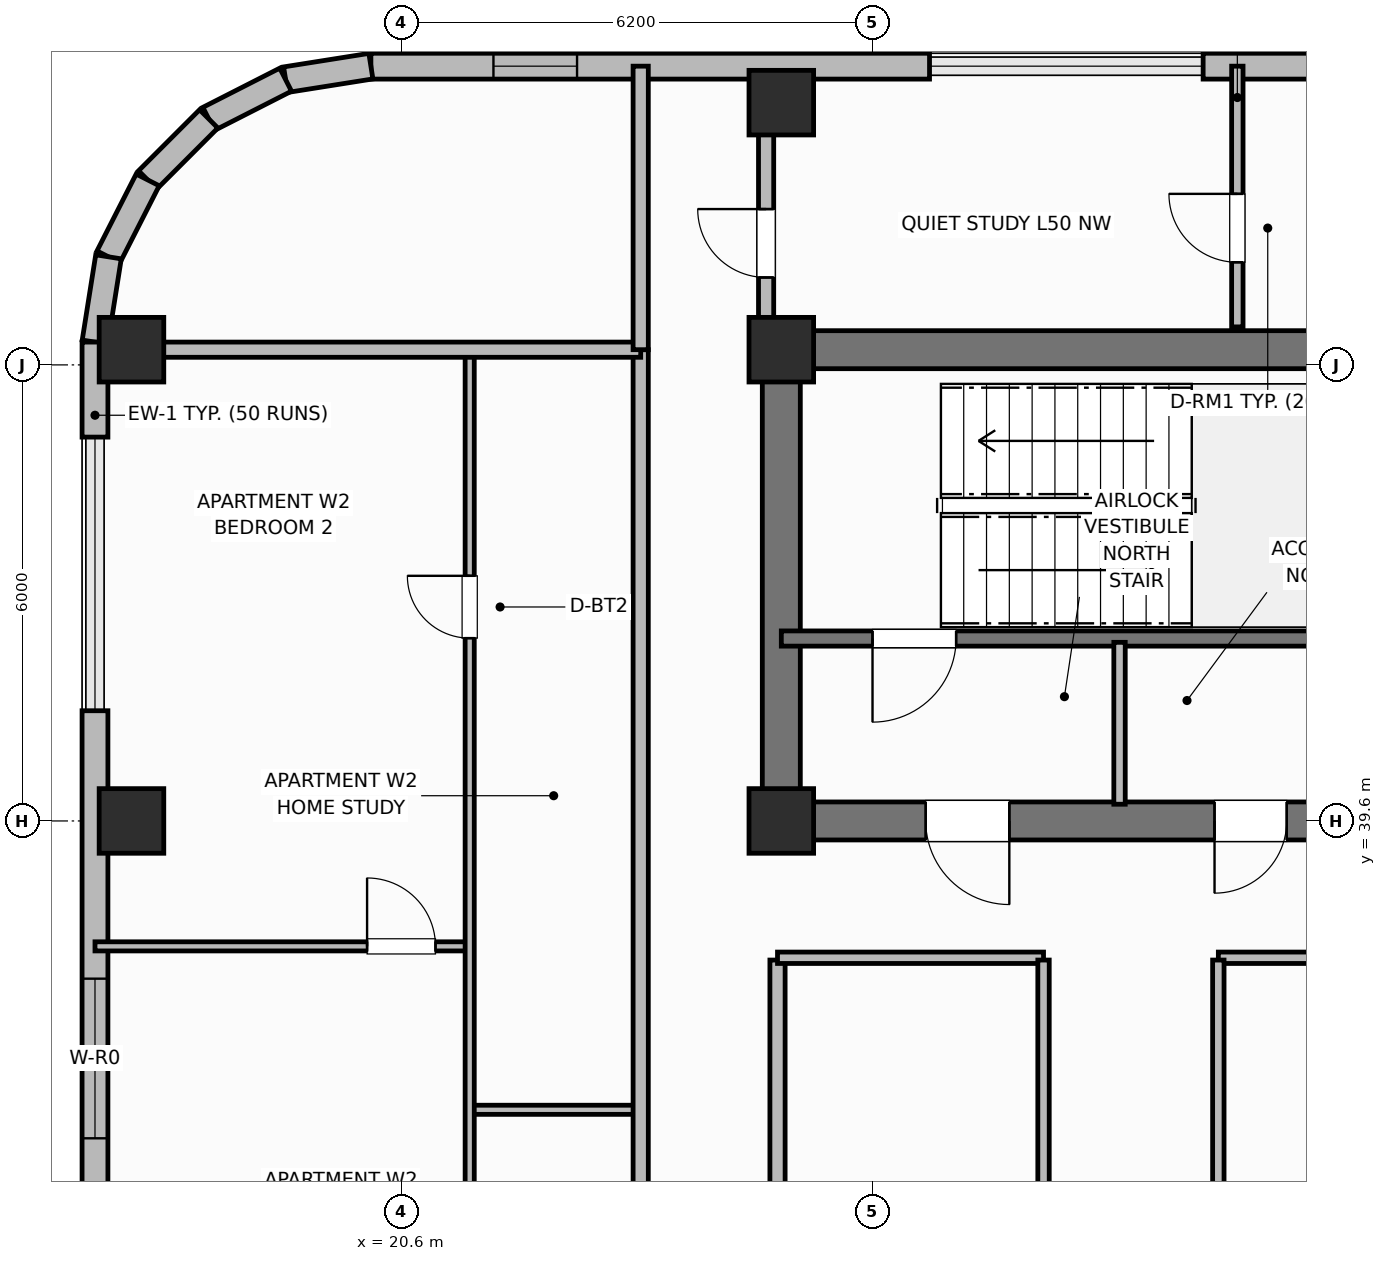
"""IFC4 building model, lengths in metres.
Left out: names, types, materials, properties, quantities, classifications, styles, units other than length and angle.
Written with IfcOpenShell. Run it as: python <this file> out.ifc"""

import sys

from ifc_helpers import new_model, si_unit, direction, frame, frame_2d, origin, origin_2d, place, context, subcontext, project, spatial, rectangle, extrude, element, fill, save


model = new_model("IFC4")
c1 = context("Model", 3, precision=1e-05, world=origin(), true_north=direction((0.0, 1.0)))
c2 = subcontext(c1, "Body", "Model", "MODEL_VIEW")
j1 = project(units=[si_unit("LENGTHUNIT", "METRE"), si_unit("PLANEANGLEUNIT", "RADIAN")], contexts=[c1])
p1 = place(None, origin())
s1 = spatial("IfcSite", under=j1, at=p1, CompositionType="ELEMENT")
p2 = place(p1, origin())
s2 = spatial("IfcBuilding", under=s1, at=p2, CompositionType="ELEMENT")
p3 = place(p2, frame((0.0, 0.0, 203.1)))
s3 = spatial("IfcBuildingStorey", under=s2, at=p3, CompositionType="ELEMENT", Elevation=203.1)
p4 = place(p3, frame((25.6, 45.8, 0.0), z_axis=(0.0, 0.0, 1.0), x_axis=(1.0, 0.0, 0.0)))
e1 = element("IfcWall", 1, at=p4, inside=s3, PredefinedType="SHEAR", context=c2, shape_type="SweptSolid", body=[
    extrude(rectangle(XDim=27.2, YDim=0.5, at=frame_2d((13.6, 0.0))), origin(), (0.0, 0.0, 1.0), 4.2),
])
p5 = place(p3, frame((25.6, 39.85, 0.0), z_axis=(0.0, 0.0, 1.0), x_axis=(0.0, 1.0, 0.0)))
e2 = element("IfcWall", 2, at=p5, inside=s3, PredefinedType="SHEAR", context=c2, shape_type="SweptSolid", body=[
    extrude(rectangle(XDim=5.7, YDim=0.5, at=frame_2d((2.85, 0.0))), origin(), (0.0, 0.0, 1.0), 4.2),
])
p6 = place(p3, frame((52.8, 39.6, 0.0), z_axis=(0.0, 0.0, 1.0), x_axis=(-1.0, 0.0, 0.0)))
e3 = element("IfcWall", 3, at=p6, inside=s3, PredefinedType="SHEAR", context=c2, shape_type="SweptSolid", body=[
    extrude(rectangle(XDim=27.2, YDim=0.5, at=frame_2d((13.6, 0.0))), origin(), (0.0, 0.0, 1.0), 4.2),
])
p7 = place(p6, frame((24.2, 0.0, 0.0)))
e4 = element("IfcOpeningElement", 4, at=p7, cuts=e3, PredefinedType="OPENING", context=c2, shape_type="SweptSolid", body=[
    extrude(rectangle(XDim=1.1, YDim=2.15, at=frame_2d((0.55, 1.075))), frame((0.0, 0.26, 0.0), z_axis=(0.0, -1.0, 0.0), x_axis=(1.0, 0.0, 0.0)), (0.0, 0.0, 1.0), 0.52),
])
p8 = place(p6, frame((20.55, 0.0, 0.0)))
e5 = element("IfcOpeningElement", 5, at=p8, cuts=e3, PredefinedType="OPENING", context=c2, shape_type="SweptSolid", body=[
    extrude(rectangle(XDim=0.95, YDim=2.1, at=frame_2d((0.475, 1.05))), frame((0.0, 0.26, 0.0), z_axis=(0.0, -1.0, 0.0), x_axis=(1.0, 0.0, 0.0)), (0.0, 0.0, 1.0), 0.52),
])
p9 = place(p6, frame((15.1, 0.0, 0.0)))
e6 = element("IfcOpeningElement", 6, at=p9, cuts=e3, PredefinedType="OPENING", context=c2, shape_type="SweptSolid", body=[
    extrude(rectangle(XDim=1.2, YDim=2.15, at=frame_2d((0.6, 1.075))), frame((0.0, 0.26, 0.0), z_axis=(0.0, -1.0, 0.0), x_axis=(1.0, 0.0, 0.0)), (0.0, 0.0, 1.0), 0.52),
])
p10 = place(p6, frame((13.05, 0.0, 0.0)))
e7 = element("IfcOpeningElement", 7, at=p10, cuts=e3, PredefinedType="OPENING", context=c2, shape_type="SweptSolid", body=[
    extrude(rectangle(XDim=0.85, YDim=2.1, at=frame_2d((0.425, 1.05))), frame((0.0, 0.26, 0.0), z_axis=(0.0, -1.0, 0.0), x_axis=(1.0, 0.0, 0.0)), (0.0, 0.0, 1.0), 0.52),
])
p11 = place(p6, frame((11.0, 0.0, 0.0)))
e8 = element("IfcOpeningElement", 8, at=p11, cuts=e3, PredefinedType="OPENING", context=c2, shape_type="SweptSolid", body=[
    extrude(rectangle(XDim=0.85, YDim=2.1, at=frame_2d((0.425, 1.05))), frame((0.0, 0.26, 0.0), z_axis=(0.0, -1.0, 0.0), x_axis=(1.0, 0.0, 0.0)), (0.0, 0.0, 1.0), 0.52),
])
p12 = place(p6, frame((7.35, 0.0, 0.0)))
e9 = element("IfcOpeningElement", 9, at=p12, cuts=e3, PredefinedType="OPENING", context=c2, shape_type="SweptSolid", body=[
    extrude(rectangle(XDim=0.85, YDim=2.1, at=frame_2d((0.425, 1.05))), frame((0.0, 0.26, 0.0), z_axis=(0.0, -1.0, 0.0), x_axis=(1.0, 0.0, 0.0)), (0.0, 0.0, 1.0), 0.52),
])
p13 = place(p6, frame((4.2, 0.0, 0.0)))
e10 = element("IfcOpeningElement", 10, at=p13, cuts=e3, PredefinedType="OPENING", context=c2, shape_type="SweptSolid", body=[
    extrude(rectangle(XDim=1.3, YDim=2.2, at=frame_2d((0.65, 1.1))), frame((0.0, 0.26, 0.0), z_axis=(0.0, -1.0, 0.0), x_axis=(1.0, 0.0, 0.0)), (0.0, 0.0, 1.0), 0.52),
])
for number, where, z_axis, x_axis in (
    (11, (25.6, 39.6, 0.0), (0.0, 0.0, 1.0), (1.0, 0.0, 0.0)),
    (12, (25.6, 45.8, 0.0), (0.0, 0.0, 1.0), (1.0, 0.0, 0.0)),
    (13, (25.6, 49.05, 0.0), (0.0, 0.0, 1.0), (1.0, 0.0, 0.0)),
    (14, (17.05, 39.6, 0.0), (0.0, 0.0, 1.0), (1.0, 0.0, 0.0)),
    (15, (17.05, 45.8, 0.0), (0.0, 0.0, 1.0), (1.0, 0.0, 0.0)),
):
    element("IfcColumn", number, at=place(p3, frame(where, z_axis=z_axis, x_axis=x_axis)), inside=s3, PredefinedType="COLUMN", context=c2, shape_type="SweptSolid", body=[
        extrude(rectangle(XDim=0.85, YDim=0.85, at=origin_2d()), origin(), (0.0, 0.0, 1.0), 4.2),
    ])
p14 = place(p3, frame((36.0, 49.53, 0.0), z_axis=(0.0, 0.0, 1.0), x_axis=(-1.0, 0.0, 0.0)))
e16 = element("IfcWall", 16, at=p14, inside=s3, PredefinedType="SOLIDWALL", context=c2, shape_type="SweptSolid", body=[
    extrude(rectangle(XDim=4.85, YDim=0.34, at=frame_2d((2.425, 0.0))), origin(), (0.0, 0.0, 1.0), 3.22),
])
p15 = place(p14, frame((2.225, 0.0, 0.95)))
e17 = element("IfcOpeningElement", 17, at=p15, cuts=e16, PredefinedType="OPENING", context=c2, shape_type="SweptSolid", body=[
    extrude(rectangle(XDim=1.1, YDim=1.65, at=frame_2d((0.55, 0.825))), frame((0.0, 0.18, 0.0), z_axis=(0.0, -1.0, 0.0), x_axis=(1.0, 0.0, 0.0)), (0.0, 0.0, 1.0), 0.36),
])
p16 = place(p3, frame((27.55, 49.53, 0.0), z_axis=(0.0, 0.0, 1.0), x_axis=(-1.0, 0.0, 0.0)))
e18 = element("IfcWall", 18, at=p16, inside=s3, PredefinedType="SOLIDWALL", context=c2, shape_type="SweptSolid", body=[
    extrude(rectangle(XDim=7.35, YDim=0.34, at=frame_2d((3.675, 0.0))), origin(), (0.0, 0.0, 1.0), 3.22),
])
p17 = place(p16, frame((4.637, 0.0, 0.95)))
e19 = element("IfcOpeningElement", 19, at=p17, cuts=e18, PredefinedType="OPENING", context=c2, shape_type="SweptSolid", body=[
    extrude(rectangle(XDim=1.1, YDim=1.65, at=frame_2d((0.55, 0.825))), frame((0.0, 0.18, 0.0), z_axis=(0.0, -1.0, 0.0), x_axis=(1.0, 0.0, 0.0)), (0.0, 0.0, 1.0), 0.36),
])
p18 = place(p3, frame((20.2, 49.53, 0.0), z_axis=(0.0, 0.0, 1.0), x_axis=(-0.987675651954, -0.156514556949, 0.0)))
e20 = element("IfcWall", 20, at=p18, inside=s3, PredefinedType="SOLIDWALL", context=c2, shape_type="SweptSolid", body=[
    extrude(rectangle(XDim=1.135, YDim=0.34, at=frame_2d((0.568, 0.0))), origin(), (0.0, 0.0, 1.0), 3.22),
])
for number, where, z_axis, x_axis in (
    (21, (19.078, 49.352, 0.0), (0.0, 0.0, 1.0), (-0.891, -0.454, 0.0)),
    (22, (18.066, 48.837, 0.0), (0.0, 0.0, 1.0), (-0.707, -0.707, 0.0)),
    (23, (17.263, 48.034, 0.0), (0.0, 0.0, 1.0), (-0.454, -0.891, 0.0)),
    (24, (16.748, 47.022, 0.0), (0.0, 0.0, 1.0), (-0.156, -0.988, 0.0)),
):
    element("IfcWall", number, at=place(p3, frame(where, z_axis=z_axis, x_axis=x_axis)), inside=s3, PredefinedType="SOLIDWALL", context=c2, shape_type="SweptSolid", body=[
        extrude(rectangle(XDim=1.136, YDim=0.34, at=frame_2d((0.568, 0.0))), origin(), (0.0, 0.0, 1.0), 3.22),
    ])
p19 = place(p3, frame((16.57, 45.9, 0.0), z_axis=(0.0, 0.0, 1.0), x_axis=(0.0, -1.0, 0.0)))
e25 = element("IfcWall", 25, at=p19, inside=s3, PredefinedType="SOLIDWALL", context=c2, shape_type="SweptSolid", body=[
    extrude(rectangle(XDim=1.25, YDim=0.34, at=frame_2d((0.625, 0.0))), origin(), (0.0, 0.0, 1.0), 3.22),
])
p20 = place(p3, frame((16.57, 41.05, 0.0), z_axis=(0.0, 0.0, 1.0), x_axis=(0.0, -1.0, 0.0)))
e26 = element("IfcWall", 26, at=p20, inside=s3, PredefinedType="SOLIDWALL", context=c2, shape_type="SweptSolid", body=[
    extrude(rectangle(XDim=8.45, YDim=0.34, at=frame_2d((4.225, 0.0))), origin(), (0.0, 0.0, 1.0), 3.22),
])
p21 = place(p20, frame((3.525, 0.0, 0.8)))
e27 = element("IfcOpeningElement", 27, at=p21, cuts=e26, PredefinedType="OPENING", context=c2, shape_type="SweptSolid", body=[
    extrude(rectangle(XDim=2.1, YDim=1.9, at=frame_2d((1.05, 0.95))), frame((0.0, 0.18, 0.0), z_axis=(0.0, -1.0, 0.0), x_axis=(1.0, 0.0, 0.0)), (0.0, 0.0, 1.0), 0.36),
])
p22 = place(p3, frame((35.15, 42.0, 0.0), z_axis=(0.0, 0.0, 1.0), x_axis=(-1.0, 0.0, 0.0)))
e28 = element("IfcWall", 28, at=p22, inside=s3, PredefinedType="SHEAR", context=c2, shape_type="SweptSolid", body=[
    extrude(rectangle(XDim=9.55, YDim=0.2, at=frame_2d((4.775, 0.0))), origin(), (0.0, 0.0, 1.0), 4.2),
])
p23 = place(p22, frame((7.25, 0.0, 0.0)))
e29 = element("IfcOpeningElement", 29, at=p23, cuts=e28, PredefinedType="OPENING", context=c2, shape_type="SweptSolid", body=[
    extrude(rectangle(XDim=1.1, YDim=2.15, at=frame_2d((0.55, 1.075))), frame((0.0, 0.11, 0.0), z_axis=(0.0, -1.0, 0.0), x_axis=(1.0, 0.0, 0.0)), (0.0, 0.0, 1.0), 0.22),
])
p24 = place(p3, frame((30.05, 39.82, 0.0), z_axis=(0.0, 0.0, 1.0), x_axis=(0.0, 1.0, 0.0)))
e30 = element("IfcWall", 30, at=p24, inside=s3, PredefinedType="PARTITIONING", context=c2, shape_type="SweptSolid", body=[
    extrude(rectangle(XDim=2.13, YDim=0.15, at=frame_2d((1.065, 0.0))), origin(), (0.0, 0.0, 1.0), 3.05),
])
p25 = place(p3, frame((25.55, 18.63, 0.0), z_axis=(0.0, 0.0, 1.0), x_axis=(0.0, 1.0, 0.0)))
e31 = element("IfcWall", 31, at=p25, inside=s3, PredefinedType="PARTITIONING", context=c2, shape_type="SweptSolid", body=[
    extrude(rectangle(XDim=19.14, YDim=0.2, at=frame_2d((9.57, 0.0))), origin(), (0.0, 0.0, 1.0), 3.05),
])
p26 = place(p3, frame((25.55, 37.8, 0.0), z_axis=(0.0, 0.0, 1.0), x_axis=(1.0, 0.0, 0.0)))
e32 = element("IfcWall", 32, at=p26, inside=s3, PredefinedType="PARTITIONING", context=c2, shape_type="SweptSolid", body=[
    extrude(rectangle(XDim=3.5, YDim=0.15, at=frame_2d((1.75, 0.0))), origin(), (0.0, 0.0, 1.0), 3.05),
])
p27 = place(p3, frame((31.35, 37.8, 0.0), z_axis=(0.0, 0.0, 1.0), x_axis=(1.0, 0.0, 0.0)))
e33 = element("IfcWall", 33, at=p27, inside=s3, PredefinedType="PARTITIONING", context=c2, shape_type="SweptSolid", body=[
    extrude(rectangle(XDim=21.5, YDim=0.15, at=frame_2d((10.75, 0.0))), origin(), (0.0, 0.0, 1.0), 3.05),
])
p28 = place(p3, frame((29.05, 18.63, 0.0), z_axis=(0.0, 0.0, 1.0), x_axis=(0.0, 1.0, 0.0)))
e34 = element("IfcWall", 34, at=p28, inside=s3, PredefinedType="PARTITIONING", context=c2, shape_type="SweptSolid", body=[
    extrude(rectangle(XDim=19.14, YDim=0.15, at=frame_2d((9.57, 0.0))), origin(), (0.0, 0.0, 1.0), 3.05),
])
p29 = place(p28, frame((5.5, 0.0, 0.0)))
e35 = element("IfcOpeningElement", 35, at=p29, cuts=e34, PredefinedType="OPENING", context=c2, shape_type="SweptSolid", body=[
    extrude(rectangle(XDim=1.0, YDim=2.15, at=frame_2d((0.5, 1.075))), frame((0.0, 0.085, 0.0), z_axis=(0.0, -1.0, 0.0), x_axis=(1.0, 0.0, 0.0)), (0.0, 0.0, 1.0), 0.17),
])
p30 = place(p3, frame((31.35, 18.63, 0.0), z_axis=(0.0, 0.0, 1.0), x_axis=(0.0, 1.0, 0.0)))
e36 = element("IfcWall", 36, at=p30, inside=s3, PredefinedType="PARTITIONING", context=c2, shape_type="SweptSolid", body=[
    extrude(rectangle(XDim=19.14, YDim=0.15, at=frame_2d((9.57, 0.0))), origin(), (0.0, 0.0, 1.0), 3.05),
])
p31 = place(p30, frame((2.4, 0.0, 0.0)))
e37 = element("IfcOpeningElement", 37, at=p31, cuts=e36, PredefinedType="OPENING", context=c2, shape_type="SweptSolid", body=[
    extrude(rectangle(XDim=1.3, YDim=2.2, at=frame_2d((0.65, 1.1))), frame((0.0, 0.085, 0.0), z_axis=(0.0, -1.0, 0.0), x_axis=(1.0, 0.0, 0.0)), (0.0, 0.0, 1.0), 0.17),
])
p32 = place(p30, frame((12.719, 0.0, 0.0)))
e38 = element("IfcOpeningElement", 38, at=p32, cuts=e36, PredefinedType="OPENING", context=c2, shape_type="SweptSolid", body=[
    extrude(rectangle(XDim=1.0, YDim=2.15, at=frame_2d((0.5, 1.075))), frame((0.0, 0.085, 0.0), z_axis=(0.0, -1.0, 0.0), x_axis=(1.0, 0.0, 0.0)), (0.0, 0.0, 1.0), 0.17),
])
p33 = place(p3, frame((21.5, 35.8, 0.0), z_axis=(0.0, 0.0, 1.0), x_axis=(1.0, 0.0, 0.0)))
e39 = element("IfcWall", 39, at=p33, inside=s3, PredefinedType="PARTITIONING", context=c2, shape_type="SweptSolid", body=[
    extrude(rectangle(XDim=2.25, YDim=0.12, at=frame_2d((1.125, 0.0))), origin(), (0.0, 0.0, 1.0), 3.05),
])
p34 = place(p3, frame((16.57, 37.95, 0.0), z_axis=(0.0, 0.0, 1.0), x_axis=(1.0, 0.0, 0.0)))
e40 = element("IfcWall", 40, at=p34, inside=s3, PredefinedType="PARTITIONING", context=c2, shape_type="SweptSolid", body=[
    extrude(rectangle(XDim=4.93, YDim=0.12, at=frame_2d((2.465, 0.0))), origin(), (0.0, 0.0, 1.0), 3.05),
])
p35 = place(p34, frame((3.58, 0.0, 0.0)))
e41 = element("IfcOpeningElement", 41, at=p35, cuts=e40, PredefinedType="OPENING", context=c2, shape_type="SweptSolid", body=[
    extrude(rectangle(XDim=0.9, YDim=2.1, at=frame_2d((0.45, 1.05))), frame((0.0, 0.07, 0.0), z_axis=(0.0, -1.0, 0.0), x_axis=(1.0, 0.0, 0.0)), (0.0, 0.0, 1.0), 0.14),
])
p36 = place(p3, frame((21.5, 26.64, 0.0), z_axis=(0.0, 0.0, 1.0), x_axis=(0.0, 1.0, 0.0)))
e42 = element("IfcWall", 42, at=p36, inside=s3, PredefinedType="PARTITIONING", context=c2, shape_type="SweptSolid", body=[
    extrude(rectangle(XDim=19.12, YDim=0.12, at=frame_2d((9.56, 0.0))), origin(), (0.0, 0.0, 1.0), 3.05),
])
p37 = place(p36, frame((2.81, 0.0, 0.0)))
e43 = element("IfcOpeningElement", 43, at=p37, cuts=e42, PredefinedType="OPENING", context=c2, shape_type="SweptSolid", body=[
    extrude(rectangle(XDim=0.9, YDim=2.1, at=frame_2d((0.45, 1.05))), frame((0.0, 0.07, 0.0), z_axis=(0.0, -1.0, 0.0), x_axis=(1.0, 0.0, 0.0)), (0.0, 0.0, 1.0), 0.14),
])
p38 = place(p36, frame((15.365, 0.0, 0.0)))
e44 = element("IfcOpeningElement", 44, at=p38, cuts=e42, PredefinedType="OPENING", context=c2, shape_type="SweptSolid", body=[
    extrude(rectangle(XDim=0.82, YDim=2.08, at=frame_2d((0.41, 1.04))), frame((0.0, 0.07, 0.0), z_axis=(0.0, -1.0, 0.0), x_axis=(1.0, 0.0, 0.0)), (0.0, 0.0, 1.0), 0.14),
])
p39 = place(p3, frame((23.75, 10.6, 0.0), z_axis=(0.0, 0.0, 1.0), x_axis=(0.0, 1.0, 0.0)))
e45 = element("IfcWall", 45, at=p39, inside=s3, PredefinedType="PARTITIONING", context=c2, shape_type="SweptSolid", body=[
    extrude(rectangle(XDim=35.2, YDim=0.2, at=frame_2d((17.6, 0.0))), origin(), (0.0, 0.0, 1.0), 3.05),
])
p40 = place(p39, frame((2.65, 0.0, 0.0)))
e46 = element("IfcOpeningElement", 46, at=p40, cuts=e45, PredefinedType="OPENING", context=c2, shape_type="SweptSolid", body=[
    extrude(rectangle(XDim=1.0, YDim=2.15, at=frame_2d((0.5, 1.075))), frame((0.0, 0.11, 0.0), z_axis=(0.0, -1.0, 0.0), x_axis=(1.0, 0.0, 0.0)), (0.0, 0.0, 1.0), 0.22),
])
p41 = place(p39, frame((19.95, 0.0, 0.0)))
e47 = element("IfcOpeningElement", 47, at=p41, cuts=e45, PredefinedType="OPENING", context=c2, shape_type="SweptSolid", body=[
    extrude(rectangle(XDim=1.0, YDim=2.15, at=frame_2d((0.5, 1.075))), frame((0.0, 0.11, 0.0), z_axis=(0.0, -1.0, 0.0), x_axis=(1.0, 0.0, 0.0)), (0.0, 0.0, 1.0), 0.22),
])
p42 = place(p3, frame((16.99, 45.8, 0.0), z_axis=(0.0, 0.0, 1.0), x_axis=(1.0, 0.0, 0.0)))
e48 = element("IfcWall", 48, at=p42, inside=s3, PredefinedType="PARTITIONING", context=c2, shape_type="SweptSolid", body=[
    extrude(rectangle(XDim=6.76, YDim=0.2, at=frame_2d((3.38, 0.0))), origin(), (0.0, 0.0, 1.0), 3.05),
])
p43 = place(p3, frame((23.75, 45.8, 0.0), z_axis=(0.0, 0.0, 1.0), x_axis=(0.0, 1.0, 0.0)))
e49 = element("IfcWall", 49, at=p43, inside=s3, PredefinedType="PARTITIONING", context=c2, shape_type="SweptSolid", body=[
    extrude(rectangle(XDim=3.73, YDim=0.2, at=frame_2d((1.865, 0.0))), origin(), (0.0, 0.0, 1.0), 3.05),
])
p44 = place(p3, frame((31.6, 46.1, 0.0), z_axis=(0.0, 0.0, 1.0), x_axis=(0.0, 1.0, 0.0)))
e50 = element("IfcWall", 50, at=p44, inside=s3, PredefinedType="PARTITIONING", context=c2, shape_type="SweptSolid", body=[
    extrude(rectangle(XDim=3.43, YDim=0.15, at=frame_2d((1.715, 0.0))), origin(), (0.0, 0.0, 1.0), 3.05),
])
p45 = place(p44, frame((0.85, 0.0, 0.0)))
e51 = element("IfcOpeningElement", 51, at=p45, cuts=e50, PredefinedType="OPENING", context=c2, shape_type="SweptSolid", body=[
    extrude(rectangle(XDim=0.9, YDim=2.1, at=frame_2d((0.45, 1.05))), frame((0.0, 0.085, 0.0), z_axis=(0.0, -1.0, 0.0), x_axis=(1.0, 0.0, 0.0)), (0.0, 0.0, 1.0), 0.17),
])
p46 = place(p3, frame((25.4, 46.1, 0.0), z_axis=(0.0, 0.0, 1.0), x_axis=(0.0, 1.0, 0.0)))
e52 = element("IfcWall", 52, at=p46, inside=s3, PredefinedType="PARTITIONING", context=c2, shape_type="SweptSolid", body=[
    extrude(rectangle(XDim=2.68, YDim=0.2, at=frame_2d((1.34, 0.0))), origin(), (0.0, 0.0, 1.0), 3.05),
])
p47 = place(p46, frame((0.65, 0.0, 0.0)))
e53 = element("IfcOpeningElement", 53, at=p47, cuts=e52, PredefinedType="OPENING", context=c2, shape_type="SweptSolid", body=[
    extrude(rectangle(XDim=0.9, YDim=2.1, at=frame_2d((0.45, 1.05))), frame((0.0, 0.11, 0.0), z_axis=(0.0, -1.0, 0.0), x_axis=(1.0, 0.0, 0.0)), (0.0, 0.0, 1.0), 0.22),
])
p48 = place(p17, origin())
e54 = element("IfcWindow", 54, at=p48, inside=s3, PartitioningType="SINGLE_PANEL", PredefinedType="WINDOW", context=c2, shape_type="SweptSolid", body=[
    extrude(rectangle(XDim=1.1, YDim=1.65, at=frame_2d((0.55, 0.825))), frame((0.0, 0.03, 0.0), z_axis=(0.0, -1.0, 0.0), x_axis=(1.0, 0.0, 0.0)), (0.0, 0.0, 1.0), 0.06),
])
fill(e19, e54)
p49 = place(p21, origin())
e55 = element("IfcWindow", 55, at=p49, inside=s3, PartitioningType="SINGLE_PANEL", PredefinedType="WINDOW", context=c2, shape_type="SweptSolid", body=[
    extrude(rectangle(XDim=2.1, YDim=1.9, at=frame_2d((1.05, 0.95))), frame((0.0, 0.03, 0.0), z_axis=(0.0, -1.0, 0.0), x_axis=(1.0, 0.0, 0.0)), (0.0, 0.0, 1.0), 0.06),
])
fill(e27, e55)
p50 = place(p23, origin())
e56 = element("IfcDoor", 56, at=p50, inside=s3, OperationType="SINGLE_SWING_RIGHT", PredefinedType="DOOR", context=c2, shape_type="SweptSolid", body=[
    extrude(rectangle(XDim=1.1, YDim=2.15, at=frame_2d((0.55, 1.075))), frame((0.0, 0.025, 0.0), z_axis=(0.0, -1.0, 0.0), x_axis=(1.0, 0.0, 0.0)), (0.0, 0.0, 1.0), 0.05),
])
fill(e29, e56)
p51 = place(p35, origin())
e57 = element("IfcDoor", 57, at=p51, inside=s3, OperationType="SINGLE_SWING_LEFT", PredefinedType="DOOR", context=c2, shape_type="SweptSolid", body=[
    extrude(rectangle(XDim=0.9, YDim=2.1, at=frame_2d((0.45, 1.05))), frame((0.0, 0.025, 0.0), z_axis=(0.0, -1.0, 0.0), x_axis=(1.0, 0.0, 0.0)), (0.0, 0.0, 1.0), 0.05),
])
fill(e41, e57)
p52 = place(p38, origin())
e58 = element("IfcDoor", 58, at=p52, inside=s3, OperationType="SINGLE_SWING_RIGHT", PredefinedType="DOOR", context=c2, shape_type="SweptSolid", body=[
    extrude(rectangle(XDim=0.82, YDim=2.08, at=frame_2d((0.41, 1.04))), frame((0.0, 0.025, 0.0), z_axis=(0.0, -1.0, 0.0), x_axis=(1.0, 0.0, 0.0)), (0.0, 0.0, 1.0), 0.05),
])
fill(e44, e58)
p53 = place(p45, origin())
e59 = element("IfcDoor", 59, at=p53, inside=s3, OperationType="SINGLE_SWING_RIGHT", PredefinedType="DOOR", context=c2, shape_type="SweptSolid", body=[
    extrude(rectangle(XDim=0.9, YDim=2.1, at=frame_2d((0.45, 1.05))), frame((0.0, 0.025, 0.0), z_axis=(0.0, -1.0, 0.0), x_axis=(1.0, 0.0, 0.0)), (0.0, 0.0, 1.0), 0.05),
])
fill(e51, e59)
p54 = place(p47, origin())
e60 = element("IfcDoor", 60, at=p54, inside=s3, OperationType="SINGLE_SWING_RIGHT", PredefinedType="DOOR", context=c2, shape_type="SweptSolid", body=[
    extrude(rectangle(XDim=0.9, YDim=2.1, at=frame_2d((0.45, 1.05))), frame((0.0, 0.025, 0.0), z_axis=(0.0, -1.0, 0.0), x_axis=(1.0, 0.0, 0.0)), (0.0, 0.0, 1.0), 0.05),
])
fill(e53, e60)
p55 = place(p7, origin())
e61 = element("IfcDoor", 61, at=p55, inside=s3, OperationType="SINGLE_SWING_LEFT", PredefinedType="DOOR", context=c2, shape_type="SweptSolid", body=[
    extrude(rectangle(XDim=1.1, YDim=2.15, at=frame_2d((0.55, 1.075))), frame((0.0, 0.025, 0.0), z_axis=(0.0, -1.0, 0.0), x_axis=(1.0, 0.0, 0.0)), (0.0, 0.0, 1.0), 0.05),
])
fill(e4, e61)
p56 = place(p8, origin())
e62 = element("IfcDoor", 62, at=p56, inside=s3, OperationType="SINGLE_SWING_RIGHT", PredefinedType="DOOR", context=c2, shape_type="SweptSolid", body=[
    extrude(rectangle(XDim=0.95, YDim=2.1, at=frame_2d((0.475, 1.05))), frame((0.0, 0.025, 0.0), z_axis=(0.0, -1.0, 0.0), x_axis=(1.0, 0.0, 0.0)), (0.0, 0.0, 1.0), 0.05),
])
fill(e5, e62)
save(model, sys.argv[1])
